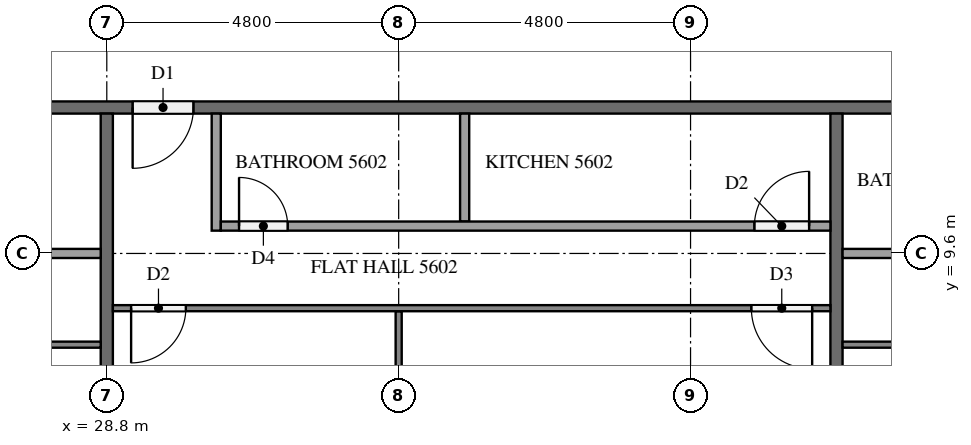
"""IFC4 building model, lengths in metres.
Left out: names, types, materials, properties, quantities, classifications, styles, units other than length and angle.
Written with IfcOpenShell. Run it as: python <this file> out.ifc"""

import sys

from ifc_helpers import new_model, si_unit, direction, frame, frame_2d, origin, place, context, subcontext, project, spatial, rectangle, extrude, element, fill, save


model = new_model("IFC4")
c1 = context("Model", 3, precision=1e-05, world=origin(), true_north=direction((0.0, 1.0)))
c2 = subcontext(c1, "Body", "Model", "MODEL_VIEW")
j1 = project(units=[si_unit("LENGTHUNIT", "METRE"), si_unit("PLANEANGLEUNIT", "RADIAN")], contexts=[c1])
p1 = place(None, origin())
s1 = spatial("IfcSite", under=j1, at=p1, CompositionType="ELEMENT")
p2 = place(p1, origin())
s2 = spatial("IfcBuilding", under=s1, at=p2, CompositionType="ELEMENT")
p3 = place(p2, frame((0.0, 0.0, 215.8)))
s3 = spatial("IfcBuildingStorey", under=s2, at=p3, CompositionType="ELEMENT", Elevation=215.8)
p4 = place(p3, frame((50.5, 12.0, 0.0), z_axis=(0.0, 0.0, 1.0), x_axis=(-1.0, 0.0, 0.0)))
e1 = element("IfcWall", 1, at=p4, inside=s3, PredefinedType="PARTITIONING", context=c2, shape_type="SweptSolid", body=[
    extrude(rectangle(XDim=38.6, YDim=0.2, at=frame_2d((19.3, 0.0))), origin(), (0.0, 0.0, 1.0), 3.2),
])
p5 = place(p4, frame((37.075, 0.0, 0.0)))
e2 = element("IfcOpeningElement", 2, at=p5, cuts=e1, PredefinedType="OPENING", context=c2, shape_type="SweptSolid", body=[
    extrude(rectangle(XDim=1.0, YDim=2.1, at=frame_2d((0.5, 1.05))), frame((0.0, 0.11, 0.0), z_axis=(0.0, -1.0, 0.0), x_axis=(1.0, 0.0, 0.0)), (0.0, 0.0, 1.0), 0.22),
])
p6 = place(p4, frame((20.275, 0.0, 0.0)))
e3 = element("IfcOpeningElement", 3, at=p6, cuts=e1, PredefinedType="OPENING", context=c2, shape_type="SweptSolid", body=[
    extrude(rectangle(XDim=1.0, YDim=2.1, at=frame_2d((0.5, 1.05))), frame((0.0, 0.11, 0.0), z_axis=(0.0, -1.0, 0.0), x_axis=(1.0, 0.0, 0.0)), (0.0, 0.0, 1.0), 0.22),
])
p7 = place(p4, frame((0.525, 0.0, 0.0)))
e4 = element("IfcOpeningElement", 4, at=p7, cuts=e1, PredefinedType="OPENING", context=c2, shape_type="SweptSolid", body=[
    extrude(rectangle(XDim=1.0, YDim=2.1, at=frame_2d((0.5, 1.05))), frame((0.0, 0.11, 0.0), z_axis=(0.0, -1.0, 0.0), x_axis=(1.0, 0.0, 0.0)), (0.0, 0.0, 1.0), 0.22),
])
p8 = place(p3, frame((28.8, 11.9, 0.0), z_axis=(0.0, 0.0, 1.0), x_axis=(0.0, -1.0, 0.0)))
e5 = element("IfcWall", 5, at=p8, inside=s3, PredefinedType="PARTITIONING", context=c2, shape_type="SweptSolid", body=[
    extrude(rectangle(XDim=6.775, YDim=0.2, at=frame_2d((3.387, 0.0))), origin(), (0.0, 0.0, 1.0), 3.2),
])
p9 = place(p3, frame((40.8, 11.9, 0.0), z_axis=(0.0, 0.0, 1.0), x_axis=(0.0, -1.0, 0.0)))
e6 = element("IfcWall", 6, at=p9, inside=s3, PredefinedType="PARTITIONING", context=c2, shape_type="SweptSolid", body=[
    extrude(rectangle(XDim=7.0, YDim=0.2, at=frame_2d((3.5, 0.0))), origin(), (0.0, 0.0, 1.0), 3.2),
])
p10 = place(p3, frame((28.7, 8.1, 0.0), z_axis=(0.0, 0.0, 1.0), x_axis=(-1.0, 0.0, 0.0)))
e7 = element("IfcWall", 7, at=p10, inside=s3, PredefinedType="PARTITIONING", context=c2, shape_type="SweptSolid", body=[
    extrude(rectangle(XDim=16.6, YDim=0.1, at=frame_2d((8.3, 0.0))), origin(), (0.0, 0.0, 1.0), 3.2),
])
p11 = place(p10, frame((15.4, 0.0, 0.0)))
e8 = element("IfcOpeningElement", 8, at=p11, cuts=e7, PredefinedType="OPENING", context=c2, shape_type="SweptSolid", body=[
    extrude(rectangle(XDim=0.9, YDim=2.1, at=frame_2d((0.45, 1.05))), frame((0.0, 0.06, 0.0), z_axis=(0.0, -1.0, 0.0), x_axis=(1.0, 0.0, 0.0)), (0.0, 0.0, 1.0), 0.12),
])
p12 = place(p10, frame((5.05, 0.0, 0.0)))
e9 = element("IfcOpeningElement", 9, at=p12, cuts=e7, PredefinedType="OPENING", context=c2, shape_type="SweptSolid", body=[
    extrude(rectangle(XDim=1.0, YDim=2.1, at=frame_2d((0.5, 1.05))), frame((0.0, 0.06, 0.0), z_axis=(0.0, -1.0, 0.0), x_axis=(1.0, 0.0, 0.0)), (0.0, 0.0, 1.0), 0.12),
])
p13 = place(p10, frame((3.45, 0.0, 0.0)))
e10 = element("IfcOpeningElement", 10, at=p13, cuts=e7, PredefinedType="OPENING", context=c2, shape_type="SweptSolid", body=[
    extrude(rectangle(XDim=0.9, YDim=2.1, at=frame_2d((0.45, 1.05))), frame((0.0, 0.06, 0.0), z_axis=(0.0, -1.0, 0.0), x_axis=(1.0, 0.0, 0.0)), (0.0, 0.0, 1.0), 0.12),
])
p14 = place(p3, frame((13.875, 9.6, 0.0), z_axis=(0.0, 0.0, 1.0), x_axis=(1.0, 0.0, 0.0)))
e11 = element("IfcWall", 11, at=p14, inside=s3, PredefinedType="PARTITIONING", context=c2, shape_type="SweptSolid", body=[
    extrude(rectangle(XDim=14.825, YDim=0.15, at=frame_2d((7.413, 0.0))), origin(), (0.0, 0.0, 1.0), 3.2),
])
p15 = place(p14, frame((0.3, 0.0, 0.0)))
e12 = element("IfcOpeningElement", 12, at=p15, cuts=e11, PredefinedType="OPENING", context=c2, shape_type="SweptSolid", body=[
    extrude(rectangle(XDim=0.9, YDim=2.1, at=frame_2d((0.45, 1.05))), frame((0.0, 0.085, 0.0), z_axis=(0.0, -1.0, 0.0), x_axis=(1.0, 0.0, 0.0)), (0.0, 0.0, 1.0), 0.17),
])
p16 = place(p14, frame((9.138, 0.0, 0.0)))
e13 = element("IfcOpeningElement", 13, at=p16, cuts=e11, PredefinedType="OPENING", context=c2, shape_type="SweptSolid", body=[
    extrude(rectangle(XDim=0.8, YDim=2.1, at=frame_2d((0.4, 1.05))), frame((0.0, 0.085, 0.0), z_axis=(0.0, -1.0, 0.0), x_axis=(1.0, 0.0, 0.0)), (0.0, 0.0, 1.0), 0.17),
])
p17 = place(p14, frame((10.588, 0.0, 0.0)))
e14 = element("IfcOpeningElement", 14, at=p17, cuts=e11, PredefinedType="OPENING", context=c2, shape_type="SweptSolid", body=[
    extrude(rectangle(XDim=0.9, YDim=2.1, at=frame_2d((0.45, 1.05))), frame((0.0, 0.085, 0.0), z_axis=(0.0, -1.0, 0.0), x_axis=(1.0, 0.0, 0.0)), (0.0, 0.0, 1.0), 0.17),
])
p18 = place(p3, frame((33.6, 8.65, 0.0), z_axis=(0.0, 0.0, 1.0), x_axis=(0.0, -1.0, 0.0)))
e15 = element("IfcWall", 15, at=p18, inside=s3, PredefinedType="PARTITIONING", context=c2, shape_type="SweptSolid", body=[
    extrude(rectangle(XDim=3.75, YDim=0.1, at=frame_2d((1.875, 0.0))), origin(), (0.0, 0.0, 1.0), 3.2),
])
p19 = place(p3, frame((40.7, 8.7, 0.0), z_axis=(0.0, 0.0, 1.0), x_axis=(-1.0, 0.0, 0.0)))
e16 = element("IfcWall", 16, at=p19, inside=s3, PredefinedType="PARTITIONING", context=c2, shape_type="SweptSolid", body=[
    extrude(rectangle(XDim=11.8, YDim=0.1, at=frame_2d((5.9, 0.0))), origin(), (0.0, 0.0, 1.0), 3.2),
])
p20 = place(p19, frame((10.6, 0.0, 0.0)))
e17 = element("IfcOpeningElement", 17, at=p20, cuts=e16, PredefinedType="OPENING", context=c2, shape_type="SweptSolid", body=[
    extrude(rectangle(XDim=0.9, YDim=2.1, at=frame_2d((0.45, 1.05))), frame((0.0, 0.06, 0.0), z_axis=(0.0, -1.0, 0.0), x_axis=(1.0, 0.0, 0.0)), (0.0, 0.0, 1.0), 0.12),
])
p21 = place(p19, frame((0.3, 0.0, 0.0)))
e18 = element("IfcOpeningElement", 18, at=p21, cuts=e16, PredefinedType="OPENING", context=c2, shape_type="SweptSolid", body=[
    extrude(rectangle(XDim=1.0, YDim=2.1, at=frame_2d((0.5, 1.05))), frame((0.0, 0.06, 0.0), z_axis=(0.0, -1.0, 0.0), x_axis=(1.0, 0.0, 0.0)), (0.0, 0.0, 1.0), 0.12),
])
p22 = place(p3, frame((34.685, 11.9, 0.0), z_axis=(0.0, 0.0, 1.0), x_axis=(0.0, -1.0, 0.0)))
e19 = element("IfcWall", 19, at=p22, inside=s3, PredefinedType="PARTITIONING", context=c2, shape_type="SweptSolid", body=[
    extrude(rectangle(XDim=1.775, YDim=0.15, at=frame_2d((0.887, 0.0))), origin(), (0.0, 0.0, 1.0), 3.2),
])
p23 = place(p3, frame((30.6, 11.9, 0.0), z_axis=(0.0, 0.0, 1.0), x_axis=(0.0, -1.0, 0.0)))
e20 = element("IfcWall", 20, at=p23, inside=s3, PredefinedType="PARTITIONING", context=c2, shape_type="SweptSolid", body=[
    extrude(rectangle(XDim=1.925, YDim=0.15, at=frame_2d((0.962, 0.0))), origin(), (0.0, 0.0, 1.0), 3.2),
])
p24 = place(p3, frame((30.675, 10.05, 0.0), z_axis=(0.0, 0.0, 1.0), x_axis=(1.0, 0.0, 0.0)))
e21 = element("IfcWall", 21, at=p24, inside=s3, PredefinedType="PARTITIONING", context=c2, shape_type="SweptSolid", body=[
    extrude(rectangle(XDim=10.025, YDim=0.15, at=frame_2d((5.012, 0.0))), origin(), (0.0, 0.0, 1.0), 3.2),
])
p25 = place(p24, frame((0.3, 0.0, 0.0)))
e22 = element("IfcOpeningElement", 22, at=p25, cuts=e21, PredefinedType="OPENING", context=c2, shape_type="SweptSolid", body=[
    extrude(rectangle(XDim=0.8, YDim=2.1, at=frame_2d((0.4, 1.05))), frame((0.0, 0.085, 0.0), z_axis=(0.0, -1.0, 0.0), x_axis=(1.0, 0.0, 0.0)), (0.0, 0.0, 1.0), 0.17),
])
p26 = place(p24, frame((8.775, 0.0, 0.0)))
e23 = element("IfcOpeningElement", 23, at=p26, cuts=e21, PredefinedType="OPENING", context=c2, shape_type="SweptSolid", body=[
    extrude(rectangle(XDim=0.9, YDim=2.1, at=frame_2d((0.45, 1.05))), frame((0.0, 0.085, 0.0), z_axis=(0.0, -1.0, 0.0), x_axis=(1.0, 0.0, 0.0)), (0.0, 0.0, 1.0), 0.17),
])
p27 = place(p3, frame((50.3, 8.1, 0.0), z_axis=(0.0, 0.0, 1.0), x_axis=(-1.0, 0.0, 0.0)))
e24 = element("IfcWall", 24, at=p27, inside=s3, PredefinedType="PARTITIONING", context=c2, shape_type="SweptSolid", body=[
    extrude(rectangle(XDim=9.4, YDim=0.1, at=frame_2d((4.7, 0.0))), origin(), (0.0, 0.0, 1.0), 3.2),
])
p28 = place(p27, frame((3.35, 0.0, 0.0)))
e25 = element("IfcOpeningElement", 25, at=p28, cuts=e24, PredefinedType="OPENING", context=c2, shape_type="SweptSolid", body=[
    extrude(rectangle(XDim=1.0, YDim=2.1, at=frame_2d((0.5, 1.05))), frame((0.0, 0.06, 0.0), z_axis=(0.0, -1.0, 0.0), x_axis=(1.0, 0.0, 0.0)), (0.0, 0.0, 1.0), 0.12),
])
p29 = place(p27, frame((5.05, 0.0, 0.0)))
e26 = element("IfcOpeningElement", 26, at=p29, cuts=e24, PredefinedType="OPENING", context=c2, shape_type="SweptSolid", body=[
    extrude(rectangle(XDim=0.9, YDim=2.1, at=frame_2d((0.45, 1.05))), frame((0.0, 0.06, 0.0), z_axis=(0.0, -1.0, 0.0), x_axis=(1.0, 0.0, 0.0)), (0.0, 0.0, 1.0), 0.12),
])
p30 = place(p3, frame((40.9, 9.6, 0.0), z_axis=(0.0, 0.0, 1.0), x_axis=(1.0, 0.0, 0.0)))
e27 = element("IfcWall", 27, at=p30, inside=s3, PredefinedType="PARTITIONING", context=c2, shape_type="SweptSolid", body=[
    extrude(rectangle(XDim=7.625, YDim=0.15, at=frame_2d((3.812, 0.0))), origin(), (0.0, 0.0, 1.0), 3.2),
])
p31 = place(p30, frame((3.375, 0.0, 0.0)))
e28 = element("IfcOpeningElement", 28, at=p31, cuts=e27, PredefinedType="OPENING", context=c2, shape_type="SweptSolid", body=[
    extrude(rectangle(XDim=0.9, YDim=2.1, at=frame_2d((0.45, 1.05))), frame((0.0, 0.085, 0.0), z_axis=(0.0, -1.0, 0.0), x_axis=(1.0, 0.0, 0.0)), (0.0, 0.0, 1.0), 0.17),
])
p32 = place(p30, frame((1.925, 0.0, 0.0)))
e29 = element("IfcOpeningElement", 29, at=p32, cuts=e27, PredefinedType="OPENING", context=c2, shape_type="SweptSolid", body=[
    extrude(rectangle(XDim=0.8, YDim=2.1, at=frame_2d((0.4, 1.05))), frame((0.0, 0.085, 0.0), z_axis=(0.0, -1.0, 0.0), x_axis=(1.0, 0.0, 0.0)), (0.0, 0.0, 1.0), 0.17),
])
p33 = place(p6, origin())
e30 = element("IfcDoor", 30, at=p33, inside=s3, OperationType="SINGLE_SWING_RIGHT", PredefinedType="DOOR", context=c2, shape_type="SweptSolid", body=[
    extrude(rectangle(XDim=1.0, YDim=2.1, at=frame_2d((0.5, 1.05))), frame((0.0, 0.025, 0.0), z_axis=(0.0, -1.0, 0.0), x_axis=(1.0, 0.0, 0.0)), (0.0, 0.0, 1.0), 0.05),
])
fill(e3, e30)
p34 = place(p20, origin())
e31 = element("IfcDoor", 31, at=p34, inside=s3, OperationType="SINGLE_SWING_RIGHT", PredefinedType="DOOR", context=c2, shape_type="SweptSolid", body=[
    extrude(rectangle(XDim=0.9, YDim=2.1, at=frame_2d((0.45, 1.05))), frame((0.0, 0.025, 0.0), z_axis=(0.0, -1.0, 0.0), x_axis=(1.0, 0.0, 0.0)), (0.0, 0.0, 1.0), 0.05),
])
fill(e17, e31)
p35 = place(p21, origin())
e32 = element("IfcDoor", 32, at=p35, inside=s3, OperationType="SINGLE_SWING_LEFT", PredefinedType="DOOR", context=c2, shape_type="SweptSolid", body=[
    extrude(rectangle(XDim=1.0, YDim=2.1, at=frame_2d((0.5, 1.05))), frame((0.0, 0.025, 0.0), z_axis=(0.0, -1.0, 0.0), x_axis=(1.0, 0.0, 0.0)), (0.0, 0.0, 1.0), 0.05),
])
fill(e18, e32)
p36 = place(p25, origin())
e33 = element("IfcDoor", 33, at=p36, inside=s3, OperationType="SINGLE_SWING_LEFT", PredefinedType="DOOR", context=c2, shape_type="SweptSolid", body=[
    extrude(rectangle(XDim=0.8, YDim=2.1, at=frame_2d((0.4, 1.05))), frame((0.0, 0.025, 0.0), z_axis=(0.0, -1.0, 0.0), x_axis=(1.0, 0.0, 0.0)), (0.0, 0.0, 1.0), 0.05),
])
fill(e22, e33)
p37 = place(p26, origin())
e34 = element("IfcDoor", 34, at=p37, inside=s3, OperationType="SINGLE_SWING_RIGHT", PredefinedType="DOOR", context=c2, shape_type="SweptSolid", body=[
    extrude(rectangle(XDim=0.9, YDim=2.1, at=frame_2d((0.45, 1.05))), frame((0.0, 0.025, 0.0), z_axis=(0.0, -1.0, 0.0), x_axis=(1.0, 0.0, 0.0)), (0.0, 0.0, 1.0), 0.05),
])
fill(e23, e34)
save(model, sys.argv[1])
